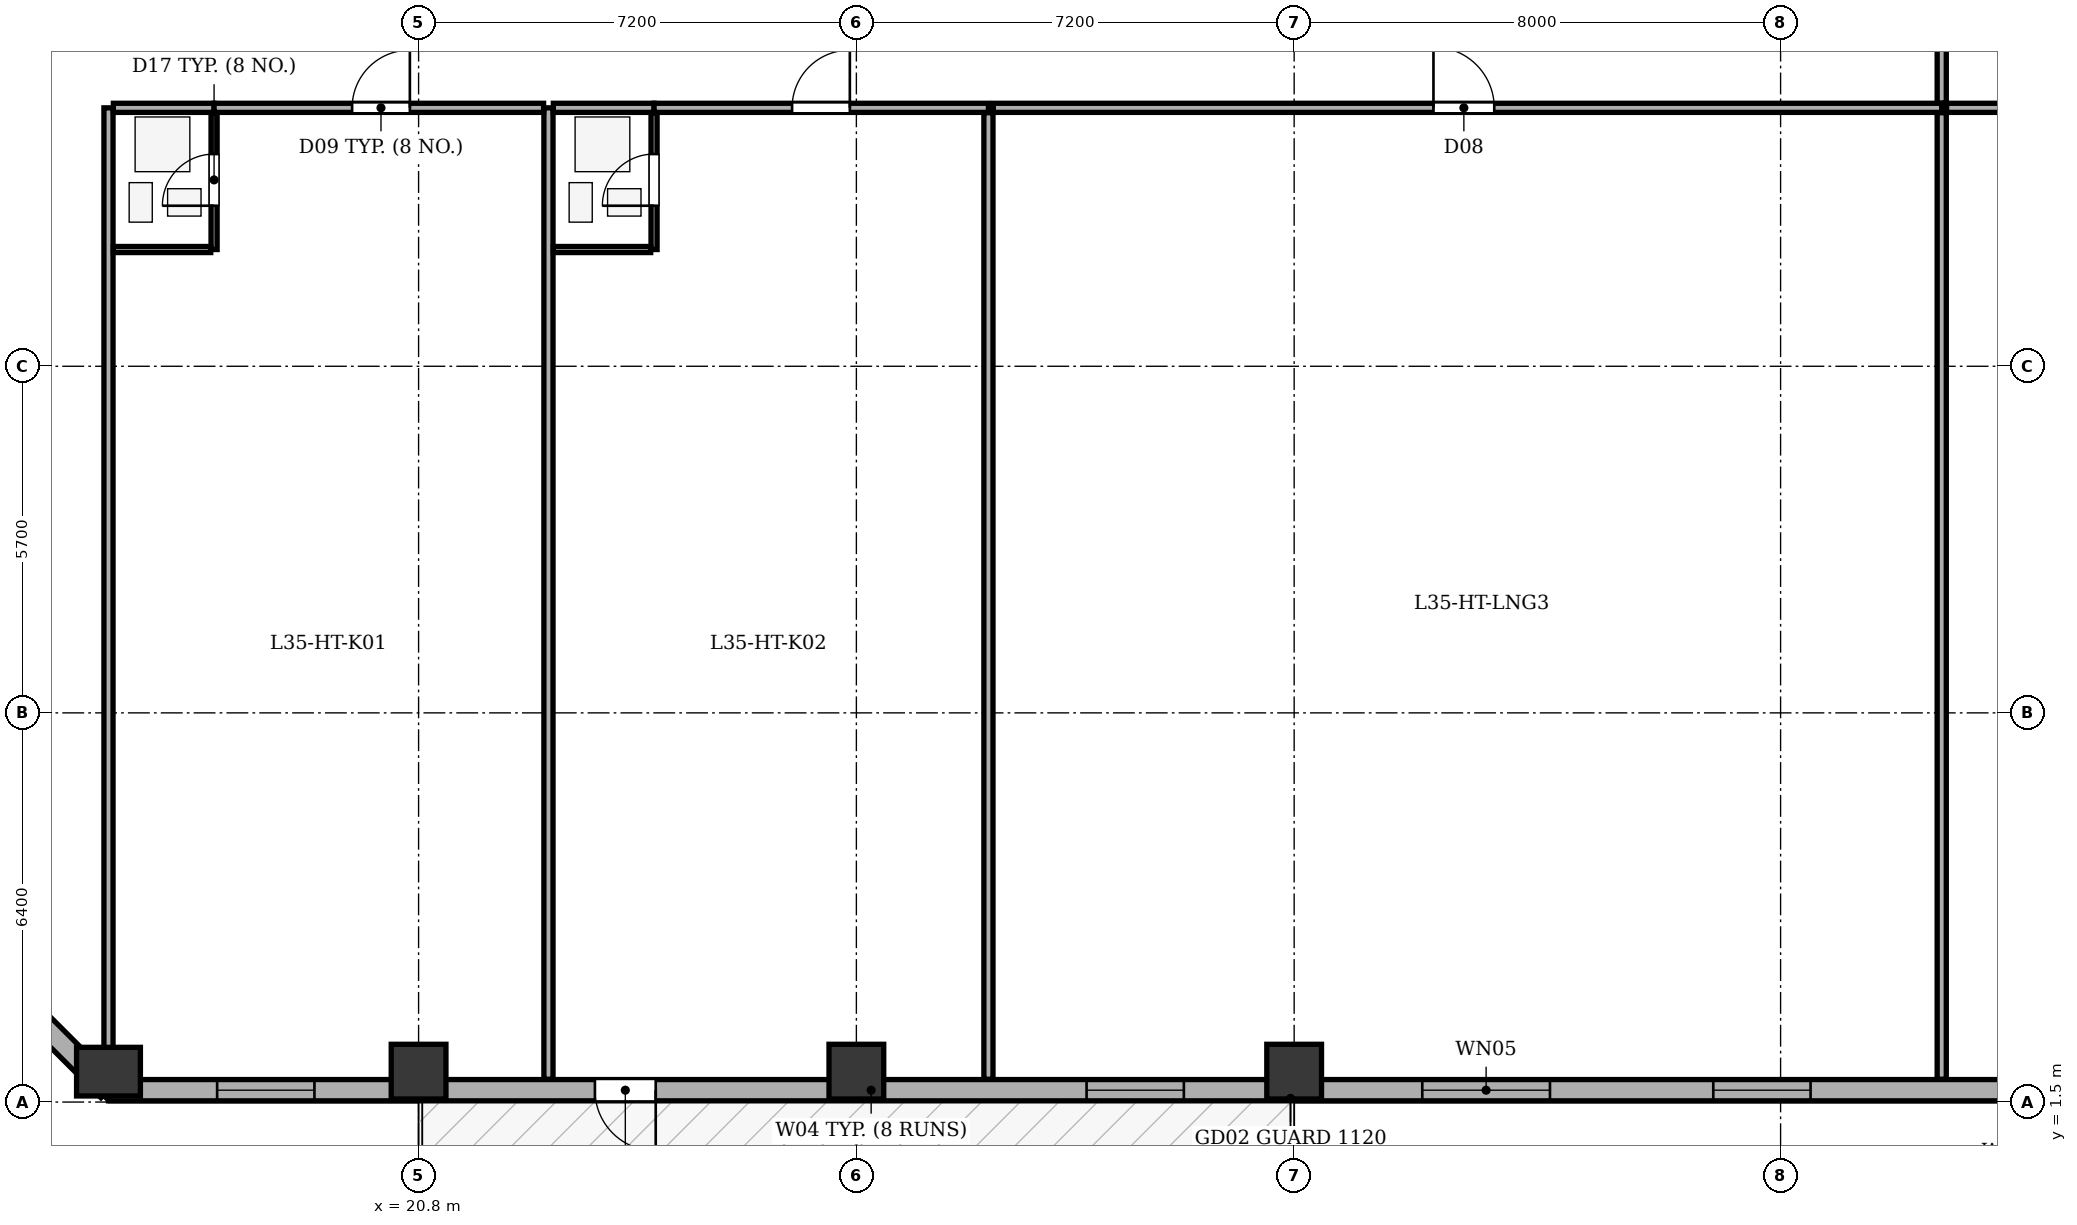
"""IFC4 building model, lengths in metres.
Left out: names, types, materials, properties, quantities, classifications, styles, units other than length and angle.
Written with IfcOpenShell. Run it as: python <this file> out.ifc"""

import sys

from ifc_helpers import new_model, si_unit, direction, frame, frame_2d, origin, origin_2d, place, context, subcontext, project, spatial, rectangle, extrude, element, fill, save


model = new_model("IFC4")
c1 = context("Model", 3, precision=1e-05, world=origin(), true_north=direction((0.0, 1.0)))
c2 = subcontext(c1, "Body", "Model", "MODEL_VIEW")
j1 = project(units=[si_unit("LENGTHUNIT", "METRE"), si_unit("PLANEANGLEUNIT", "RADIAN")], contexts=[c1])
p1 = place(None, origin())
s1 = spatial("IfcSite", under=j1, at=p1, CompositionType="ELEMENT")
p2 = place(p1, origin())
s2 = spatial("IfcBuilding", under=s1, at=p2, CompositionType="ELEMENT")
p3 = place(p2, frame((0.0, 0.0, 141.3)))
s3 = spatial("IfcBuildingStorey", under=s2, at=p3, CompositionType="ELEMENT", Elevation=141.3)
p4 = place(p3, frame((15.7, 2.0, 0.0), z_axis=(0.0, 0.0, 1.0), x_axis=(1.0, 0.0, 0.0)))
e1 = element("IfcColumn", 1, at=p4, inside=s3, PredefinedType="COLUMN", context=c2, shape_type="SweptSolid", body=[
    extrude(rectangle(XDim=0.8, YDim=1.05, at=origin_2d()), origin(), (0.0, 0.0, 1.0), 3.5),
])
for number, where, z_axis, x_axis in (
    (2, (20.8, 2.0, 0.0), (0.0, 0.0, 1.0), (1.0, 0.0, 0.0)),
    (3, (28.0, 2.0, 0.0), (0.0, 0.0, 1.0), (1.0, 0.0, 0.0)),
    (4, (35.2, 2.0, 0.0), (0.0, 0.0, 1.0), (1.0, 0.0, 0.0)),
):
    element("IfcColumn", number, at=place(p3, frame(where, z_axis=z_axis, x_axis=x_axis)), inside=s3, PredefinedType="COLUMN", context=c2, shape_type="SweptSolid", body=[
        extrude(rectangle(XDim=0.9, YDim=0.9, at=origin_2d()), origin(), (0.0, 0.0, 1.0), 3.5),
    ])
p5 = place(p3, frame((50.7, 1.695, 0.0), z_axis=(0.0, 0.0, 1.0), x_axis=(-1.0, 0.0, 0.0)))
e5 = element("IfcWall", 5, at=p5, inside=s3, PredefinedType="STANDARD", context=c2, shape_type="SweptSolid", body=[
    extrude(rectangle(XDim=35.0, YDim=0.35, at=frame_2d((17.5, 0.0))), origin(), (0.0, 0.0, 1.0), 2.785),
])
p6 = place(p5, frame((26.0, 0.0, 0.0)))
e6 = element("IfcOpeningElement", 6, at=p6, cuts=e5, PredefinedType="OPENING", context=c2, shape_type="SweptSolid", body=[
    extrude(rectangle(XDim=1.0, YDim=2.02, at=frame_2d((0.5, 1.01))), frame((0.0, 0.185, 0.0), z_axis=(0.0, -1.0, 0.0), x_axis=(1.0, 0.0, 0.0)), (0.0, 0.0, 1.0), 0.37),
])
p7 = place(p5, frame((1.763, 0.0, 0.75)))
e7 = element("IfcOpeningElement", 7, at=p7, cuts=e5, PredefinedType="OPENING", context=c2, shape_type="SweptSolid", body=[
    extrude(rectangle(XDim=1.6, YDim=1.75, at=frame_2d((0.8, 0.875))), frame((0.0, 0.185, 0.0), z_axis=(0.0, -1.0, 0.0), x_axis=(1.0, 0.0, 0.0)), (0.0, 0.0, 1.0), 0.37),
])
p8 = place(p5, frame((7.007, 0.0, 0.75)))
e8 = element("IfcOpeningElement", 8, at=p8, cuts=e5, PredefinedType="OPENING", context=c2, shape_type="SweptSolid", body=[
    extrude(rectangle(XDim=1.6, YDim=1.75, at=frame_2d((0.8, 0.875))), frame((0.0, 0.185, 0.0), z_axis=(0.0, -1.0, 0.0), x_axis=(1.0, 0.0, 0.0)), (0.0, 0.0, 1.0), 0.37),
])
p9 = place(p5, frame((11.293, 0.0, 0.75)))
e9 = element("IfcOpeningElement", 9, at=p9, cuts=e5, PredefinedType="OPENING", context=c2, shape_type="SweptSolid", body=[
    extrude(rectangle(XDim=2.1, YDim=1.75, at=frame_2d((1.05, 0.875))), frame((0.0, 0.185, 0.0), z_axis=(0.0, -1.0, 0.0), x_axis=(1.0, 0.0, 0.0)), (0.0, 0.0, 1.0), 0.37),
])
p10 = place(p5, frame((17.314, 0.0, 0.75)))
e10 = element("IfcOpeningElement", 10, at=p10, cuts=e5, PredefinedType="OPENING", context=c2, shape_type="SweptSolid", body=[
    extrude(rectangle(XDim=1.6, YDim=1.75, at=frame_2d((0.8, 0.875))), frame((0.0, 0.185, 0.0), z_axis=(0.0, -1.0, 0.0), x_axis=(1.0, 0.0, 0.0)), (0.0, 0.0, 1.0), 0.37),
])
p11 = place(p5, frame((31.613, 0.0, 0.75)))
e11 = element("IfcOpeningElement", 11, at=p11, cuts=e5, PredefinedType="OPENING", context=c2, shape_type="SweptSolid", body=[
    extrude(rectangle(XDim=1.6, YDim=1.75, at=frame_2d((0.8, 0.875))), frame((0.0, 0.185, 0.0), z_axis=(0.0, -1.0, 0.0), x_axis=(1.0, 0.0, 0.0)), (0.0, 0.0, 1.0), 0.37),
])
p12 = place(p3, frame((15.7, 1.695, 0.0), z_axis=(0.0, 0.0, 1.0), x_axis=(-0.707106781187, 0.707106781187, 0.0)))
e12 = element("IfcWall", 12, at=p12, inside=s3, PredefinedType="STANDARD", context=c2, shape_type="SweptSolid", body=[
    extrude(rectangle(XDim=6.795, YDim=0.35, at=frame_2d((3.397, 0.0))), origin(), (0.0, 0.0, 1.0), 2.785),
])
p13 = place(p12, frame((2.698, 0.0, 0.75)))
e13 = element("IfcOpeningElement", 13, at=p13, cuts=e12, PredefinedType="OPENING", context=c2, shape_type="SweptSolid", body=[
    extrude(rectangle(XDim=1.4, YDim=1.65, at=frame_2d((0.7, 0.825))), frame((0.0, 0.185, 0.0), z_axis=(0.0, -1.0, 0.0), x_axis=(1.0, 0.0, 0.0)), (0.0, 0.0, 1.0), 0.37),
])
for number, where, z_axis, x_axis in (
    (14, (15.7, 1.875, 0.0), (0.0, 0.0, 1.0), (0.0, 1.0, 0.0)),
    (15, (22.936, 1.875, 0.0), (0.0, 0.0, 1.0), (0.0, 1.0, 0.0)),
):
    element("IfcWall", number, at=place(p3, frame(where, z_axis=z_axis, x_axis=x_axis)), inside=s3, PredefinedType="PARTITIONING", context=c2, shape_type="SweptSolid", body=[
        extrude(rectangle(XDim=15.975, YDim=0.15, at=frame_2d((7.988, 0.0))), origin(), (0.0, 0.0, 1.0), 3.2),
    ])
p14 = place(p3, frame((15.78, 17.85, 0.0), z_axis=(0.0, 0.0, 1.0), x_axis=(1.0, 0.0, 0.0)))
e16 = element("IfcWall", 16, at=p14, inside=s3, PredefinedType="PARTITIONING", context=c2, shape_type="SweptSolid", body=[
    extrude(rectangle(XDim=1.656, YDim=0.15, at=frame_2d((0.828, 0.0))), origin(), (0.0, 0.0, 1.0), 3.2),
])
p15 = place(p3, frame((17.437, 17.85, 0.0), z_axis=(0.0, 0.0, 1.0), x_axis=(1.0, 0.0, 0.0)))
e17 = element("IfcWall", 17, at=p15, inside=s3, PredefinedType="PARTITIONING", context=c2, shape_type="SweptSolid", body=[
    extrude(rectangle(XDim=5.419, YDim=0.15, at=frame_2d((2.71, 0.0))), origin(), (0.0, 0.0, 1.0), 3.2),
])
p16 = place(p15, frame((2.27, 0.0, 0.0)))
e18 = element("IfcOpeningElement", 18, at=p16, cuts=e17, PredefinedType="OPENING", context=c2, shape_type="SweptSolid", body=[
    extrude(rectangle(XDim=0.95, YDim=2.1, at=frame_2d((0.475, 1.05))), frame((0.0, 0.085, 0.0), z_axis=(0.0, -1.0, 0.0), x_axis=(1.0, 0.0, 0.0)), (0.0, 0.0, 1.0), 0.17),
])
p17 = place(p3, frame((17.437, 15.52, 0.0), z_axis=(0.0, 0.0, 1.0), x_axis=(0.0, 1.0, 0.0)))
e19 = element("IfcWall", 19, at=p17, inside=s3, PredefinedType="PARTITIONING", context=c2, shape_type="SweptSolid", body=[
    extrude(rectangle(XDim=2.25, YDim=0.1, at=frame_2d((1.125, 0.0))), origin(), (0.0, 0.0, 1.0), 3.2),
])
p18 = place(p17, frame((0.72, 0.0, 0.0)))
e20 = element("IfcOpeningElement", 20, at=p18, cuts=e19, PredefinedType="OPENING", context=c2, shape_type="SweptSolid", body=[
    extrude(rectangle(XDim=0.85, YDim=2.05, at=frame_2d((0.425, 1.025))), frame((0.0, 0.06, 0.0), z_axis=(0.0, -1.0, 0.0), x_axis=(1.0, 0.0, 0.0)), (0.0, 0.0, 1.0), 0.12),
])
p19 = place(p3, frame((15.78, 15.52, 0.0), z_axis=(0.0, 0.0, 1.0), x_axis=(1.0, 0.0, 0.0)))
e21 = element("IfcWall", 21, at=p19, inside=s3, PredefinedType="PARTITIONING", context=c2, shape_type="SweptSolid", body=[
    extrude(rectangle(XDim=1.602, YDim=0.1, at=frame_2d((0.801, 0.0))), origin(), (0.0, 0.0, 1.0), 3.2),
])
p20 = place(p3, frame((23.016, 17.85, 0.0), z_axis=(0.0, 0.0, 1.0), x_axis=(1.0, 0.0, 0.0)))
e22 = element("IfcWall", 22, at=p20, inside=s3, PredefinedType="PARTITIONING", context=c2, shape_type="SweptSolid", body=[
    extrude(rectangle(XDim=1.656, YDim=0.15, at=frame_2d((0.828, 0.0))), origin(), (0.0, 0.0, 1.0), 3.2),
])
p21 = place(p3, frame((24.673, 17.85, 0.0), z_axis=(0.0, 0.0, 1.0), x_axis=(1.0, 0.0, 0.0)))
e23 = element("IfcWall", 23, at=p21, inside=s3, PredefinedType="PARTITIONING", context=c2, shape_type="SweptSolid", body=[
    extrude(rectangle(XDim=5.5, YDim=0.15, at=frame_2d((2.75, 0.0))), origin(), (0.0, 0.0, 1.0), 3.2),
])
p22 = place(p21, frame((2.27, 0.0, 0.0)))
e24 = element("IfcOpeningElement", 24, at=p22, cuts=e23, PredefinedType="OPENING", context=c2, shape_type="SweptSolid", body=[
    extrude(rectangle(XDim=0.95, YDim=2.1, at=frame_2d((0.475, 1.05))), frame((0.0, 0.085, 0.0), z_axis=(0.0, -1.0, 0.0), x_axis=(1.0, 0.0, 0.0)), (0.0, 0.0, 1.0), 0.17),
])
p23 = place(p3, frame((24.673, 15.52, 0.0), z_axis=(0.0, 0.0, 1.0), x_axis=(0.0, 1.0, 0.0)))
e25 = element("IfcWall", 25, at=p23, inside=s3, PredefinedType="PARTITIONING", context=c2, shape_type="SweptSolid", body=[
    extrude(rectangle(XDim=2.25, YDim=0.1, at=frame_2d((1.125, 0.0))), origin(), (0.0, 0.0, 1.0), 3.2),
])
p24 = place(p23, frame((0.72, 0.0, 0.0)))
e26 = element("IfcOpeningElement", 26, at=p24, cuts=e25, PredefinedType="OPENING", context=c2, shape_type="SweptSolid", body=[
    extrude(rectangle(XDim=0.85, YDim=2.05, at=frame_2d((0.425, 1.025))), frame((0.0, 0.06, 0.0), z_axis=(0.0, -1.0, 0.0), x_axis=(1.0, 0.0, 0.0)), (0.0, 0.0, 1.0), 0.12),
])
p25 = place(p3, frame((23.016, 15.52, 0.0), z_axis=(0.0, 0.0, 1.0), x_axis=(1.0, 0.0, 0.0)))
e27 = element("IfcWall", 27, at=p25, inside=s3, PredefinedType="PARTITIONING", context=c2, shape_type="SweptSolid", body=[
    extrude(rectangle(XDim=1.602, YDim=0.1, at=frame_2d((0.801, 0.0))), origin(), (0.0, 0.0, 1.0), 3.2),
])
p26 = place(p3, frame((30.172, 1.875, 0.0), z_axis=(0.0, 0.0, 1.0), x_axis=(0.0, 1.0, 0.0)))
e28 = element("IfcWall", 28, at=p26, inside=s3, PredefinedType="PARTITIONING", context=c2, shape_type="SweptSolid", body=[
    extrude(rectangle(XDim=15.895, YDim=0.15, at=frame_2d((7.948, 0.0))), origin(), (0.0, 0.0, 1.0), 3.2),
])
p27 = place(p3, frame((30.252, 17.85, 0.0), z_axis=(0.0, 0.0, 1.0), x_axis=(1.0, 0.0, 0.0)))
e29 = element("IfcWall", 29, at=p27, inside=s3, PredefinedType="PARTITIONING", context=c2, shape_type="SweptSolid", body=[
    extrude(rectangle(XDim=15.598, YDim=0.15, at=frame_2d((7.799, 0.0))), origin(), (0.0, 0.0, 1.0), 3.2),
])
p28 = place(p27, frame((7.239, 0.0, 0.0)))
e30 = element("IfcOpeningElement", 30, at=p28, cuts=e29, PredefinedType="OPENING", context=c2, shape_type="SweptSolid", body=[
    extrude(rectangle(XDim=1.0, YDim=2.1, at=frame_2d((0.5, 1.05))), frame((0.0, 0.085, 0.0), z_axis=(0.0, -1.0, 0.0), x_axis=(1.0, 0.0, 0.0)), (0.0, 0.0, 1.0), 0.17),
])
p29 = place(p3, frame((45.85, 1.875, 0.0), z_axis=(0.0, 0.0, 1.0), x_axis=(0.0, 1.0, 0.0)))
e31 = element("IfcWall", 31, at=p29, inside=s3, PredefinedType="PARTITIONING", context=c2, shape_type="SweptSolid", body=[
    extrude(rectangle(XDim=15.895, YDim=0.15, at=frame_2d((7.948, 0.0))), origin(), (0.0, 0.0, 1.0), 3.2),
])
p30 = place(p3, frame((45.93, 17.85, 0.0), z_axis=(0.0, 0.0, 1.0), x_axis=(1.0, 0.0, 0.0)))
e32 = element("IfcWall", 32, at=p30, inside=s3, PredefinedType="PARTITIONING", context=c2, shape_type="SweptSolid", body=[
    extrude(rectangle(XDim=9.395, YDim=0.15, at=frame_2d((4.698, 0.0))), origin(), (0.0, 0.0, 1.0), 3.2),
])
p31 = place(p3, frame((45.85, 17.93, 0.0), z_axis=(0.0, 0.0, 1.0), x_axis=(0.0, 1.0, 0.0)))
e33 = element("IfcWall", 33, at=p31, inside=s3, PredefinedType="PARTITIONING", context=c2, shape_type="SweptSolid", body=[
    extrude(rectangle(XDim=18.54, YDim=0.15, at=frame_2d((9.27, 0.0))), origin(), (0.0, 0.0, 1.0), 3.2),
])
p32 = place(p31, frame((8.79, 0.0, 0.0)))
e34 = element("IfcOpeningElement", 34, at=p32, cuts=e33, PredefinedType="OPENING", context=c2, shape_type="SweptSolid", body=[
    extrude(rectangle(XDim=0.95, YDim=2.1, at=frame_2d((0.475, 1.05))), frame((0.0, 0.085, 0.0), z_axis=(0.0, -1.0, 0.0), x_axis=(1.0, 0.0, 0.0)), (0.0, 0.0, 1.0), 0.17),
])
p33 = place(p6, origin())
e35 = element("IfcDoor", 35, at=p33, inside=s3, OperationType="SINGLE_SWING_LEFT", PredefinedType="DOOR", context=c2, shape_type="SweptSolid", body=[
    extrude(rectangle(XDim=1.0, YDim=2.02, at=frame_2d((0.5, 1.01))), frame((0.0, 0.025, 0.0), z_axis=(0.0, -1.0, 0.0), x_axis=(1.0, 0.0, 0.0)), (0.0, 0.0, 1.0), 0.05),
])
fill(e6, e35)
p34 = place(p8, origin())
e36 = element("IfcWindow", 36, at=p34, inside=s3, PartitioningType="SINGLE_PANEL", PredefinedType="WINDOW", context=c2, shape_type="SweptSolid", body=[
    extrude(rectangle(XDim=1.6, YDim=1.75, at=frame_2d((0.8, 0.875))), frame((0.0, -0.01, 0.0), z_axis=(0.0, -1.0, 0.0), x_axis=(1.0, 0.0, 0.0)), (0.0, 0.0, 1.0), 0.06),
])
fill(e8, e36)
p35 = place(p9, origin())
e37 = element("IfcWindow", 37, at=p35, inside=s3, PartitioningType="SINGLE_PANEL", PredefinedType="WINDOW", context=c2, shape_type="SweptSolid", body=[
    extrude(rectangle(XDim=2.1, YDim=1.75, at=frame_2d((1.05, 0.875))), frame((0.0, -0.01, 0.0), z_axis=(0.0, -1.0, 0.0), x_axis=(1.0, 0.0, 0.0)), (0.0, 0.0, 1.0), 0.06),
])
fill(e9, e37)
p36 = place(p10, origin())
e38 = element("IfcWindow", 38, at=p36, inside=s3, PartitioningType="SINGLE_PANEL", PredefinedType="WINDOW", context=c2, shape_type="SweptSolid", body=[
    extrude(rectangle(XDim=1.6, YDim=1.75, at=frame_2d((0.8, 0.875))), frame((0.0, -0.01, 0.0), z_axis=(0.0, -1.0, 0.0), x_axis=(1.0, 0.0, 0.0)), (0.0, 0.0, 1.0), 0.06),
])
fill(e10, e38)
p37 = place(p11, origin())
e39 = element("IfcWindow", 39, at=p37, inside=s3, PartitioningType="SINGLE_PANEL", PredefinedType="WINDOW", context=c2, shape_type="SweptSolid", body=[
    extrude(rectangle(XDim=1.6, YDim=1.75, at=frame_2d((0.8, 0.875))), frame((0.0, -0.01, 0.0), z_axis=(0.0, -1.0, 0.0), x_axis=(1.0, 0.0, 0.0)), (0.0, 0.0, 1.0), 0.06),
])
fill(e11, e39)
p38 = place(p18, origin())
e40 = element("IfcDoor", 40, at=p38, inside=s3, OperationType="SINGLE_SWING_LEFT", PredefinedType="DOOR", context=c2, shape_type="SweptSolid", body=[
    extrude(rectangle(XDim=0.85, YDim=2.05, at=frame_2d((0.425, 1.025))), frame((0.0, 0.025, 0.0), z_axis=(0.0, -1.0, 0.0), x_axis=(1.0, 0.0, 0.0)), (0.0, 0.0, 1.0), 0.05),
])
fill(e20, e40)
p39 = place(p16, origin())
e41 = element("IfcDoor", 41, at=p39, inside=s3, OperationType="SINGLE_SWING_RIGHT", PredefinedType="DOOR", context=c2, shape_type="SweptSolid", body=[
    extrude(rectangle(XDim=0.95, YDim=2.1, at=frame_2d((0.475, 1.05))), frame((0.0, 0.025, 0.0), z_axis=(0.0, -1.0, 0.0), x_axis=(1.0, 0.0, 0.0)), (0.0, 0.0, 1.0), 0.05),
])
fill(e18, e41)
p40 = place(p24, origin())
e42 = element("IfcDoor", 42, at=p40, inside=s3, OperationType="SINGLE_SWING_LEFT", PredefinedType="DOOR", context=c2, shape_type="SweptSolid", body=[
    extrude(rectangle(XDim=0.85, YDim=2.05, at=frame_2d((0.425, 1.025))), frame((0.0, 0.025, 0.0), z_axis=(0.0, -1.0, 0.0), x_axis=(1.0, 0.0, 0.0)), (0.0, 0.0, 1.0), 0.05),
])
fill(e26, e42)
p41 = place(p22, origin())
e43 = element("IfcDoor", 43, at=p41, inside=s3, OperationType="SINGLE_SWING_RIGHT", PredefinedType="DOOR", context=c2, shape_type="SweptSolid", body=[
    extrude(rectangle(XDim=0.95, YDim=2.1, at=frame_2d((0.475, 1.05))), frame((0.0, 0.025, 0.0), z_axis=(0.0, -1.0, 0.0), x_axis=(1.0, 0.0, 0.0)), (0.0, 0.0, 1.0), 0.05),
])
fill(e24, e43)
p42 = place(p28, origin())
e44 = element("IfcDoor", 44, at=p42, inside=s3, OperationType="SINGLE_SWING_LEFT", PredefinedType="DOOR", context=c2, shape_type="SweptSolid", body=[
    extrude(rectangle(XDim=1.0, YDim=2.1, at=frame_2d((0.5, 1.05))), frame((0.0, 0.025, 0.0), z_axis=(0.0, -1.0, 0.0), x_axis=(1.0, 0.0, 0.0)), (0.0, 0.0, 1.0), 0.05),
])
fill(e30, e44)
save(model, sys.argv[1])
